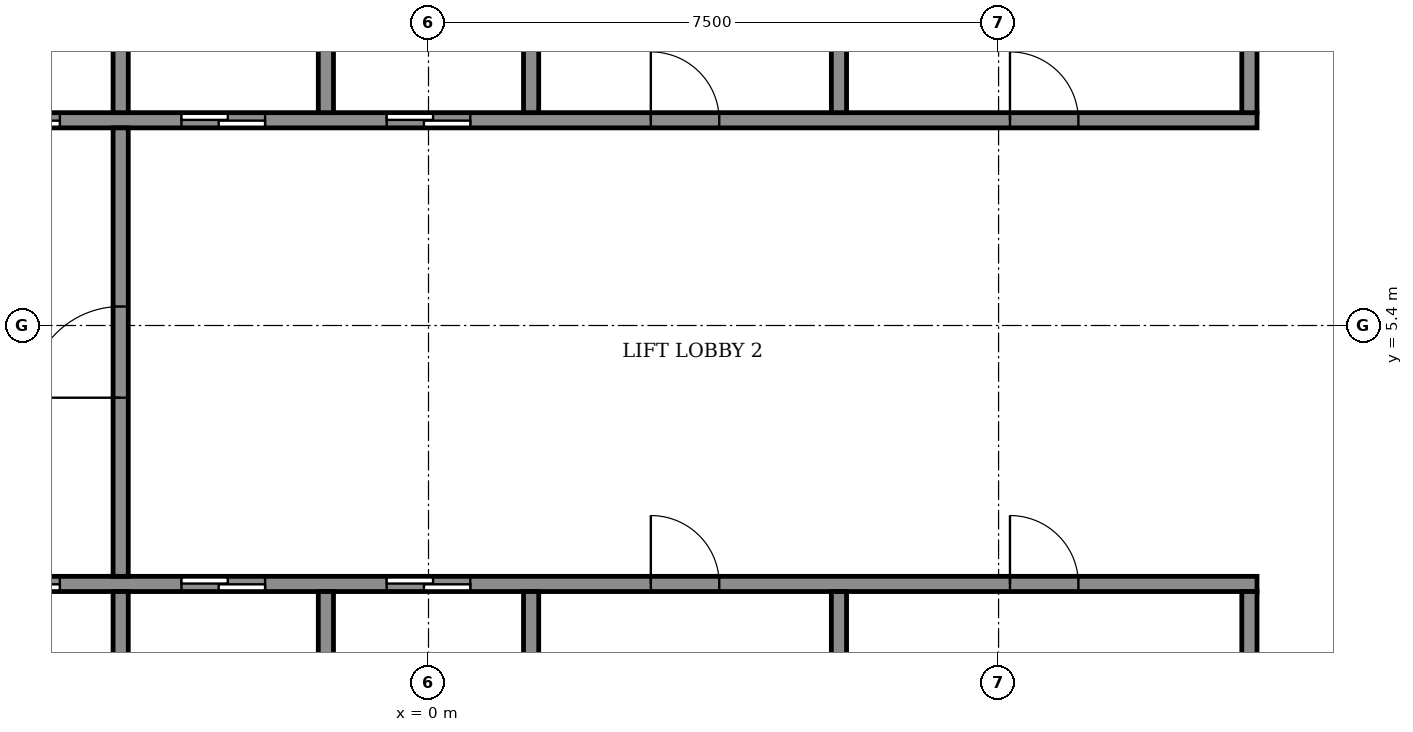
"""IFC4 building model, lengths in metres.
Left out: names, types, materials, properties, quantities, classifications, styles, units other than length and angle.
Written with IfcOpenShell. Run it as: python <this file> out.ifc"""

import sys

from ifc_helpers import new_model, si_unit, direction, frame, frame_2d, origin, place, context, subcontext, project, spatial, rectangle, extrude, element, fill, save


model = new_model("IFC4")
c1 = context("Model", 3, precision=1e-05, world=origin(), true_north=direction((0.0, 1.0)))
c2 = subcontext(c1, "Body", "Model", "MODEL_VIEW")
j1 = project(units=[si_unit("LENGTHUNIT", "METRE"), si_unit("PLANEANGLEUNIT", "RADIAN")], contexts=[c1])
p1 = place(None, origin())
s1 = spatial("IfcSite", under=j1, at=p1, CompositionType="ELEMENT")
p2 = place(p1, origin())
s2 = spatial("IfcBuilding", under=s1, at=p2, CompositionType="ELEMENT")
p3 = place(p2, frame((0.0, 0.0, 238.3)))
s3 = spatial("IfcBuildingStorey", under=s2, at=p3, CompositionType="ELEMENT", Elevation=238.3)
p4 = place(p3, frame((-10.9, 2.0, 0.0), z_axis=(0.0, 0.0, 1.0), x_axis=(1.0, 0.0, 0.0)))
e1 = element("IfcWall", 1, at=p4, inside=s3, PredefinedType="SHEAR", context=c2, shape_type="SweptSolid", body=[
    extrude(rectangle(XDim=21.8, YDim=0.2, at=frame_2d((10.9, 0.0))), origin(), (0.0, 0.0, 1.0), 3.05),
])
p5 = place(p4, frame((4.95, 0.0, 0.0)))
e2 = element("IfcOpeningElement", 2, at=p5, cuts=e1, PredefinedType="OPENING", context=c2, shape_type="SweptSolid", body=[
    extrude(rectangle(XDim=1.1, YDim=2.1, at=frame_2d((0.55, 1.05))), frame((0.0, 0.11, 0.0), z_axis=(0.0, -1.0, 0.0), x_axis=(1.0, 0.0, 0.0)), (0.0, 0.0, 1.0), 0.22),
])
p6 = place(p4, frame((7.65, 0.0, 0.0)))
e3 = element("IfcOpeningElement", 3, at=p6, cuts=e1, PredefinedType="OPENING", context=c2, shape_type="SweptSolid", body=[
    extrude(rectangle(XDim=1.1, YDim=2.1, at=frame_2d((0.55, 1.05))), frame((0.0, 0.11, 0.0), z_axis=(0.0, -1.0, 0.0), x_axis=(1.0, 0.0, 0.0)), (0.0, 0.0, 1.0), 0.22),
])
p7 = place(p4, frame((10.35, 0.0, 0.0)))
e4 = element("IfcOpeningElement", 4, at=p7, cuts=e1, PredefinedType="OPENING", context=c2, shape_type="SweptSolid", body=[
    extrude(rectangle(XDim=1.1, YDim=2.1, at=frame_2d((0.55, 1.05))), frame((0.0, 0.11, 0.0), z_axis=(0.0, -1.0, 0.0), x_axis=(1.0, 0.0, 0.0)), (0.0, 0.0, 1.0), 0.22),
])
p8 = place(p4, frame((1.675, 0.0, 0.0)))
e5 = element("IfcOpeningElement", 5, at=p8, cuts=e1, PredefinedType="OPENING", context=c2, shape_type="SweptSolid", body=[
    extrude(rectangle(XDim=0.9, YDim=2.1, at=frame_2d((0.45, 1.05))), frame((0.0, 0.11, 0.0), z_axis=(0.0, -1.0, 0.0), x_axis=(1.0, 0.0, 0.0)), (0.0, 0.0, 1.0), 0.22),
])
p9 = place(p4, frame((13.825, 0.0, 0.0)))
e6 = element("IfcOpeningElement", 6, at=p9, cuts=e1, PredefinedType="OPENING", context=c2, shape_type="SweptSolid", body=[
    extrude(rectangle(XDim=0.9, YDim=2.1, at=frame_2d((0.45, 1.05))), frame((0.0, 0.11, 0.0), z_axis=(0.0, -1.0, 0.0), x_axis=(1.0, 0.0, 0.0)), (0.0, 0.0, 1.0), 0.22),
])
p10 = place(p4, frame((18.55, 0.0, 0.0)))
e7 = element("IfcOpeningElement", 7, at=p10, cuts=e1, PredefinedType="OPENING", context=c2, shape_type="SweptSolid", body=[
    extrude(rectangle(XDim=0.9, YDim=2.1, at=frame_2d((0.45, 1.05))), frame((0.0, 0.11, 0.0), z_axis=(0.0, -1.0, 0.0), x_axis=(1.0, 0.0, 0.0)), (0.0, 0.0, 1.0), 0.22),
])
p11 = place(p3, frame((-10.9, 8.1, 0.0), z_axis=(0.0, 0.0, 1.0), x_axis=(1.0, 0.0, 0.0)))
e8 = element("IfcWall", 8, at=p11, inside=s3, PredefinedType="SHEAR", context=c2, shape_type="SweptSolid", body=[
    extrude(rectangle(XDim=21.8, YDim=0.2, at=frame_2d((10.9, 0.0))), origin(), (0.0, 0.0, 1.0), 3.05),
])
p12 = place(p11, frame((4.95, 0.0, 0.0)))
e9 = element("IfcOpeningElement", 9, at=p12, cuts=e8, PredefinedType="OPENING", context=c2, shape_type="SweptSolid", body=[
    extrude(rectangle(XDim=1.1, YDim=2.1, at=frame_2d((0.55, 1.05))), frame((0.0, 0.11, 0.0), z_axis=(0.0, -1.0, 0.0), x_axis=(1.0, 0.0, 0.0)), (0.0, 0.0, 1.0), 0.22),
])
p13 = place(p11, frame((7.65, 0.0, 0.0)))
e10 = element("IfcOpeningElement", 10, at=p13, cuts=e8, PredefinedType="OPENING", context=c2, shape_type="SweptSolid", body=[
    extrude(rectangle(XDim=1.1, YDim=2.1, at=frame_2d((0.55, 1.05))), frame((0.0, 0.11, 0.0), z_axis=(0.0, -1.0, 0.0), x_axis=(1.0, 0.0, 0.0)), (0.0, 0.0, 1.0), 0.22),
])
p14 = place(p11, frame((10.35, 0.0, 0.0)))
e11 = element("IfcOpeningElement", 11, at=p14, cuts=e8, PredefinedType="OPENING", context=c2, shape_type="SweptSolid", body=[
    extrude(rectangle(XDim=1.1, YDim=2.1, at=frame_2d((0.55, 1.05))), frame((0.0, 0.11, 0.0), z_axis=(0.0, -1.0, 0.0), x_axis=(1.0, 0.0, 0.0)), (0.0, 0.0, 1.0), 0.22),
])
p15 = place(p11, frame((1.675, 0.0, 0.0)))
e12 = element("IfcOpeningElement", 12, at=p15, cuts=e8, PredefinedType="OPENING", context=c2, shape_type="SweptSolid", body=[
    extrude(rectangle(XDim=0.9, YDim=2.1, at=frame_2d((0.45, 1.05))), frame((0.0, 0.11, 0.0), z_axis=(0.0, -1.0, 0.0), x_axis=(1.0, 0.0, 0.0)), (0.0, 0.0, 1.0), 0.22),
])
p16 = place(p11, frame((13.825, 0.0, 0.0)))
e13 = element("IfcOpeningElement", 13, at=p16, cuts=e8, PredefinedType="OPENING", context=c2, shape_type="SweptSolid", body=[
    extrude(rectangle(XDim=0.9, YDim=2.1, at=frame_2d((0.45, 1.05))), frame((0.0, 0.11, 0.0), z_axis=(0.0, -1.0, 0.0), x_axis=(1.0, 0.0, 0.0)), (0.0, 0.0, 1.0), 0.22),
])
p17 = place(p11, frame((18.55, 0.0, 0.0)))
e14 = element("IfcOpeningElement", 14, at=p17, cuts=e8, PredefinedType="OPENING", context=c2, shape_type="SweptSolid", body=[
    extrude(rectangle(XDim=0.9, YDim=2.1, at=frame_2d((0.45, 1.05))), frame((0.0, 0.11, 0.0), z_axis=(0.0, -1.0, 0.0), x_axis=(1.0, 0.0, 0.0)), (0.0, 0.0, 1.0), 0.22),
])
for number, where, z_axis, x_axis in (
    (15, (-4.05, -0.6, 0.0), (0.0, 0.0, 1.0), (0.0, 1.0, 0.0)),
    (16, (-1.35, -0.6, 0.0), (0.0, 0.0, 1.0), (0.0, 1.0, 0.0)),
    (17, (1.35, -0.6, 0.0), (0.0, 0.0, 1.0), (0.0, 1.0, 0.0)),
):
    element("IfcWall", number, at=place(p3, frame(where, z_axis=z_axis, x_axis=x_axis)), inside=s3, PredefinedType="SHEAR", context=c2, shape_type="SweptSolid", body=[
        extrude(rectangle(XDim=2.5, YDim=0.2, at=frame_2d((1.25, 0.0))), origin(), (0.0, 0.0, 1.0), 3.05),
    ])
for number, where, z_axis, x_axis in (
    (18, (5.4, -0.6, 0.0), (0.0, 0.0, 1.0), (0.0, 1.0, 0.0)),
    (19, (10.8, -0.6, 0.0), (0.0, 0.0, 1.0), (0.0, 1.0, 0.0)),
):
    element("IfcWall", number, at=place(p3, frame(where, z_axis=z_axis, x_axis=x_axis)), inside=s3, PredefinedType="STANDARD", context=c2, shape_type="SweptSolid", body=[
        extrude(rectangle(XDim=2.5, YDim=0.2, at=frame_2d((1.25, 0.0))), origin(), (0.0, 0.0, 1.0), 3.05),
    ])
for number, where, z_axis, x_axis in (
    (20, (-4.05, 8.2, 0.0), (0.0, 0.0, 1.0), (0.0, 1.0, 0.0)),
    (21, (-1.35, 8.2, 0.0), (0.0, 0.0, 1.0), (0.0, 1.0, 0.0)),
    (22, (1.35, 8.2, 0.0), (0.0, 0.0, 1.0), (0.0, 1.0, 0.0)),
):
    element("IfcWall", number, at=place(p3, frame(where, z_axis=z_axis, x_axis=x_axis)), inside=s3, PredefinedType="SHEAR", context=c2, shape_type="SweptSolid", body=[
        extrude(rectangle(XDim=2.6, YDim=0.2, at=frame_2d((1.3, 0.0))), origin(), (0.0, 0.0, 1.0), 3.05),
    ])
for number, where, z_axis, x_axis in (
    (23, (5.4, 8.2, 0.0), (0.0, 0.0, 1.0), (0.0, 1.0, 0.0)),
    (24, (10.8, 8.2, 0.0), (0.0, 0.0, 1.0), (0.0, 1.0, 0.0)),
):
    element("IfcWall", number, at=place(p3, frame(where, z_axis=z_axis, x_axis=x_axis)), inside=s3, PredefinedType="STANDARD", context=c2, shape_type="SweptSolid", body=[
        extrude(rectangle(XDim=2.6, YDim=0.2, at=frame_2d((1.3, 0.0))), origin(), (0.0, 0.0, 1.0), 3.05),
    ])
p18 = place(p3, frame((-4.05, 2.1, 0.0), z_axis=(0.0, 0.0, 1.0), x_axis=(0.0, 1.0, 0.0)))
e25 = element("IfcWall", 25, at=p18, inside=s3, PredefinedType="STANDARD", context=c2, shape_type="SweptSolid", body=[
    extrude(rectangle(XDim=5.9, YDim=0.2, at=frame_2d((2.95, 0.0))), origin(), (0.0, 0.0, 1.0), 3.05),
])
p19 = place(p18, frame((2.35, 0.0, 0.0)))
e26 = element("IfcOpeningElement", 26, at=p19, cuts=e25, PredefinedType="OPENING", context=c2, shape_type="SweptSolid", body=[
    extrude(rectangle(XDim=1.2, YDim=2.1, at=frame_2d((0.6, 1.05))), frame((0.0, 0.11, 0.0), z_axis=(0.0, -1.0, 0.0), x_axis=(1.0, 0.0, 0.0)), (0.0, 0.0, 1.0), 0.22),
])
p20 = place(p5, origin())
e27 = element("IfcDoor", 27, at=p20, inside=s3, OperationType="SLIDING_TO_LEFT", PredefinedType="DOOR", context=c2, shape_type="SweptSolid", body=[
    extrude(rectangle(XDim=1.1, YDim=2.1, at=frame_2d((0.55, 1.05))), frame((0.0, 0.025, 0.0), z_axis=(0.0, -1.0, 0.0), x_axis=(1.0, 0.0, 0.0)), (0.0, 0.0, 1.0), 0.05),
])
fill(e2, e27)
p21 = place(p6, origin())
e28 = element("IfcDoor", 28, at=p21, inside=s3, OperationType="SLIDING_TO_LEFT", PredefinedType="DOOR", context=c2, shape_type="SweptSolid", body=[
    extrude(rectangle(XDim=1.1, YDim=2.1, at=frame_2d((0.55, 1.05))), frame((0.0, 0.025, 0.0), z_axis=(0.0, -1.0, 0.0), x_axis=(1.0, 0.0, 0.0)), (0.0, 0.0, 1.0), 0.05),
])
fill(e3, e28)
p22 = place(p7, origin())
e29 = element("IfcDoor", 29, at=p22, inside=s3, OperationType="SLIDING_TO_LEFT", PredefinedType="DOOR", context=c2, shape_type="SweptSolid", body=[
    extrude(rectangle(XDim=1.1, YDim=2.1, at=frame_2d((0.55, 1.05))), frame((0.0, 0.025, 0.0), z_axis=(0.0, -1.0, 0.0), x_axis=(1.0, 0.0, 0.0)), (0.0, 0.0, 1.0), 0.05),
])
fill(e4, e29)
p23 = place(p12, origin())
e30 = element("IfcDoor", 30, at=p23, inside=s3, OperationType="SLIDING_TO_LEFT", PredefinedType="DOOR", context=c2, shape_type="SweptSolid", body=[
    extrude(rectangle(XDim=1.1, YDim=2.1, at=frame_2d((0.55, 1.05))), frame((0.0, 0.025, 0.0), z_axis=(0.0, -1.0, 0.0), x_axis=(1.0, 0.0, 0.0)), (0.0, 0.0, 1.0), 0.05),
])
fill(e9, e30)
p24 = place(p13, origin())
e31 = element("IfcDoor", 31, at=p24, inside=s3, OperationType="SLIDING_TO_LEFT", PredefinedType="DOOR", context=c2, shape_type="SweptSolid", body=[
    extrude(rectangle(XDim=1.1, YDim=2.1, at=frame_2d((0.55, 1.05))), frame((0.0, 0.025, 0.0), z_axis=(0.0, -1.0, 0.0), x_axis=(1.0, 0.0, 0.0)), (0.0, 0.0, 1.0), 0.05),
])
fill(e10, e31)
p25 = place(p14, origin())
e32 = element("IfcDoor", 32, at=p25, inside=s3, OperationType="SLIDING_TO_LEFT", PredefinedType="DOOR", context=c2, shape_type="SweptSolid", body=[
    extrude(rectangle(XDim=1.1, YDim=2.1, at=frame_2d((0.55, 1.05))), frame((0.0, 0.025, 0.0), z_axis=(0.0, -1.0, 0.0), x_axis=(1.0, 0.0, 0.0)), (0.0, 0.0, 1.0), 0.05),
])
fill(e11, e32)
p26 = place(p9, origin())
e33 = element("IfcDoor", 33, at=p26, inside=s3, OperationType="SINGLE_SWING_RIGHT", PredefinedType="DOOR", context=c2, shape_type="SweptSolid", body=[
    extrude(rectangle(XDim=0.9, YDim=2.1, at=frame_2d((0.45, 1.05))), frame((0.0, 0.025, 0.0), z_axis=(0.0, -1.0, 0.0), x_axis=(1.0, 0.0, 0.0)), (0.0, 0.0, 1.0), 0.05),
])
fill(e6, e33)
p27 = place(p10, origin())
e34 = element("IfcDoor", 34, at=p27, inside=s3, OperationType="SINGLE_SWING_RIGHT", PredefinedType="DOOR", context=c2, shape_type="SweptSolid", body=[
    extrude(rectangle(XDim=0.9, YDim=2.1, at=frame_2d((0.45, 1.05))), frame((0.0, 0.025, 0.0), z_axis=(0.0, -1.0, 0.0), x_axis=(1.0, 0.0, 0.0)), (0.0, 0.0, 1.0), 0.05),
])
fill(e7, e34)
p28 = place(p16, origin())
e35 = element("IfcDoor", 35, at=p28, inside=s3, OperationType="SINGLE_SWING_RIGHT", PredefinedType="DOOR", context=c2, shape_type="SweptSolid", body=[
    extrude(rectangle(XDim=0.9, YDim=2.1, at=frame_2d((0.45, 1.05))), frame((0.0, 0.025, 0.0), z_axis=(0.0, -1.0, 0.0), x_axis=(1.0, 0.0, 0.0)), (0.0, 0.0, 1.0), 0.05),
])
fill(e13, e35)
p29 = place(p17, origin())
e36 = element("IfcDoor", 36, at=p29, inside=s3, OperationType="SINGLE_SWING_LEFT", PredefinedType="DOOR", context=c2, shape_type="SweptSolid", body=[
    extrude(rectangle(XDim=0.9, YDim=2.1, at=frame_2d((0.45, 1.05))), frame((0.0, 0.025, 0.0), z_axis=(0.0, -1.0, 0.0), x_axis=(1.0, 0.0, 0.0)), (0.0, 0.0, 1.0), 0.05),
])
fill(e14, e36)
p30 = place(p19, origin())
e37 = element("IfcDoor", 37, at=p30, inside=s3, OperationType="SINGLE_SWING_LEFT", PredefinedType="DOOR", context=c2, shape_type="SweptSolid", body=[
    extrude(rectangle(XDim=1.2, YDim=2.1, at=frame_2d((0.6, 1.05))), frame((0.0, 0.025, 0.0), z_axis=(0.0, -1.0, 0.0), x_axis=(1.0, 0.0, 0.0)), (0.0, 0.0, 1.0), 0.05),
])
fill(e26, e37)
save(model, sys.argv[1])
